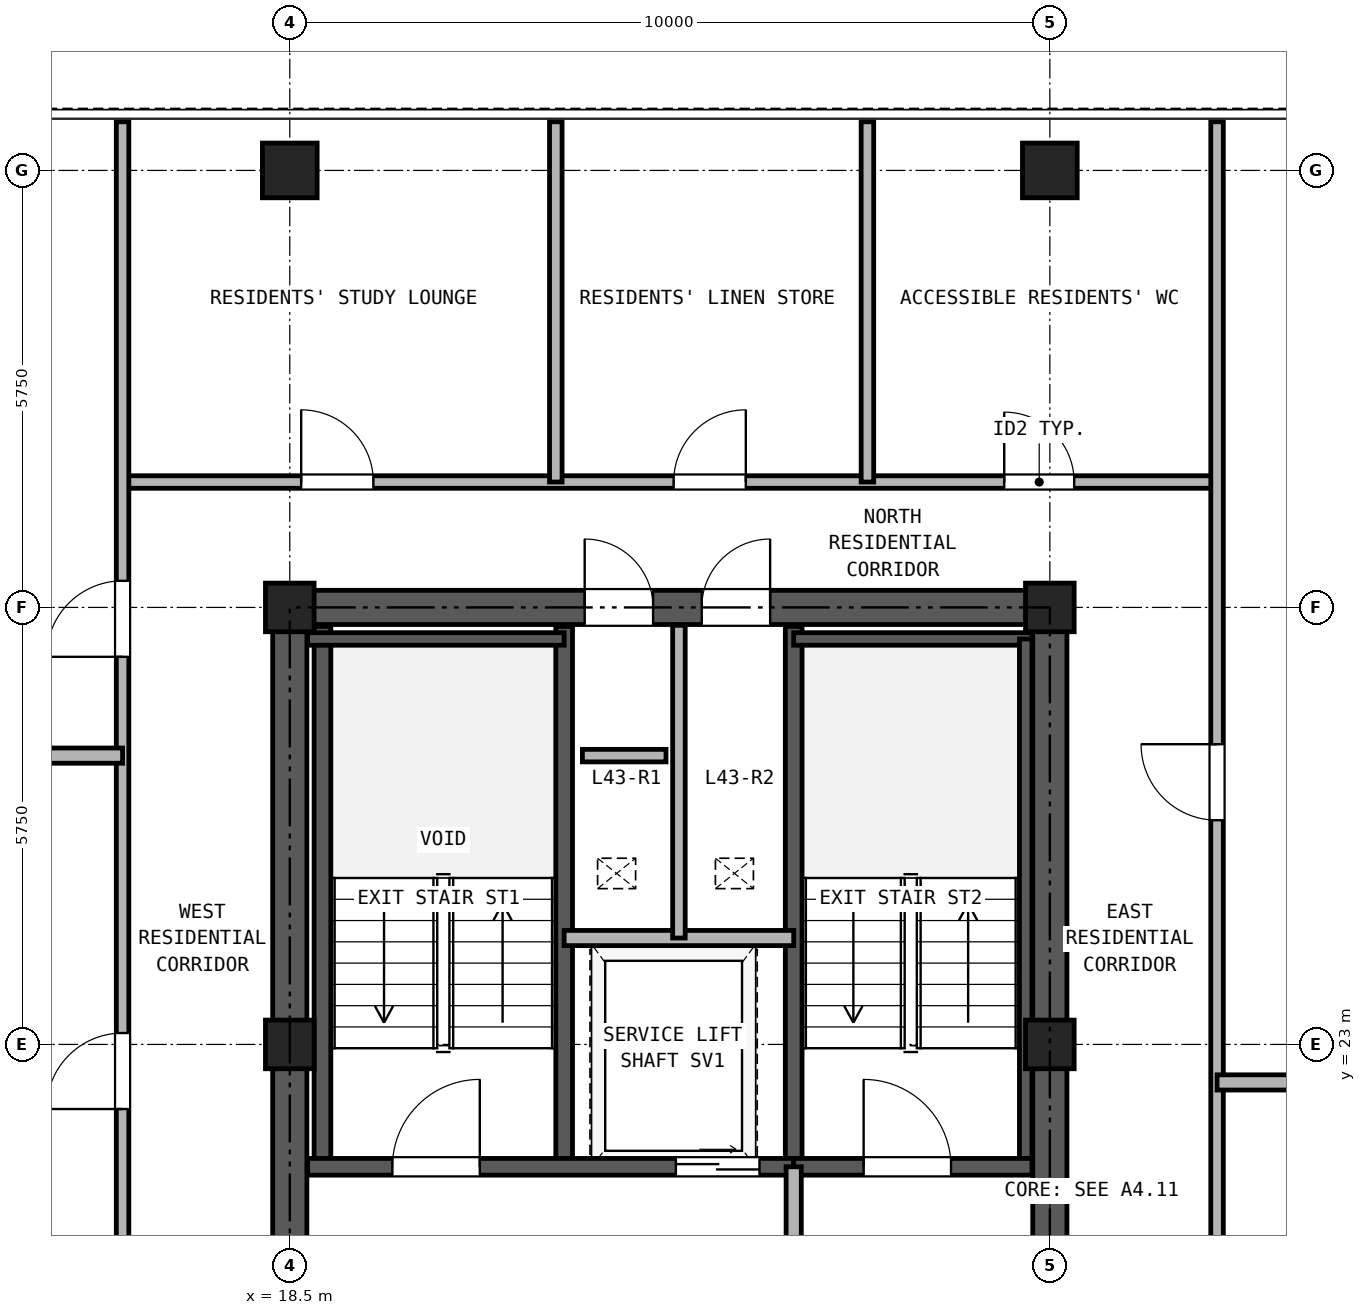
"""IFC4 building model, lengths in metres.
Left out: names, types, materials, properties, quantities, classifications, styles, units other than length and angle.
Written with IfcOpenShell. Run it as: python <this file> out.ifc"""

import sys

from ifc_helpers import new_model, si_unit, direction, frame, frame_2d, origin, origin_2d, place, context, subcontext, project, spatial, rectangle, hollow_rectangle, extrude, source, transform, mapped, element, fill, save


model = new_model("IFC4")
c1 = context("Model", 3, precision=1e-05, world=origin(), true_north=direction((0.0, 1.0)))
c2 = subcontext(c1, "Body", "Model", "MODEL_VIEW")
j1 = project(units=[si_unit("LENGTHUNIT", "METRE"), si_unit("PLANEANGLEUNIT", "RADIAN")], contexts=[c1])
p1 = place(None, origin())
s1 = spatial("IfcSite", under=j1, at=p1, CompositionType="ELEMENT")
p2 = place(p1, origin())
s2 = spatial("IfcBuilding", under=s1, at=p2, CompositionType="ELEMENT")
p3 = place(p2, frame((0.0, 0.0, 156.1)))
s3 = spatial("IfcBuildingStorey", under=s2, at=p3, CompositionType="ELEMENT", Elevation=156.1)
m1 = source(origin(), c2, "Body", "SweptSolid", [
    extrude(hollow_rectangle(XDim=0.72, YDim=0.72, WallThickness=0.04, at=origin_2d()), origin(), (0.0, 0.0, 1.0), 2.95),
])
for number, where, z_axis, x_axis in (
    (1, (18.5, 34.5, 0.0), (0.0, 0.0, 1.0), (1.0, 0.0, 0.0)),
    (2, (28.5, 34.5, 0.0), (0.0, 0.0, 1.0), (1.0, 0.0, 0.0)),
):
    element("IfcColumn", number, at=place(p3, frame(where, z_axis=z_axis, x_axis=x_axis)), inside=s3, PredefinedType="COLUMN", context=c2, shape_type="MappedRepresentation", body=[
        mapped(m1, transform((0.0, 0.0, 0.0), x_axis=(1.0, 0.0, 0.0), y_axis=(0.0, 1.0, 0.0), z_axis=(0.0, 0.0, 1.0), scale=1.0)),
    ])
m2 = source(origin(), c2, "Body", "SweptSolid", [
    extrude(hollow_rectangle(XDim=0.64, YDim=0.64, WallThickness=0.035, at=origin_2d()), origin(), (0.0, 0.0, 1.0), 2.95),
])
for number, where, z_axis, x_axis in (
    (3, (18.5, 23.0, 0.0), (0.0, 0.0, 1.0), (1.0, 0.0, 0.0)),
    (4, (18.5, 28.75, 0.0), (0.0, 0.0, 1.0), (1.0, 0.0, 0.0)),
    (5, (28.5, 23.0, 0.0), (0.0, 0.0, 1.0), (1.0, 0.0, 0.0)),
    (6, (28.5, 28.75, 0.0), (0.0, 0.0, 1.0), (1.0, 0.0, 0.0)),
):
    element("IfcColumn", number, at=place(p3, frame(where, z_axis=z_axis, x_axis=x_axis)), inside=s3, PredefinedType="COLUMN", context=c2, shape_type="MappedRepresentation", body=[
        mapped(m2, transform((0.0, 0.0, 0.0), x_axis=(1.0, 0.0, 0.0), y_axis=(0.0, 1.0, 0.0), z_axis=(0.0, 0.0, 1.0), scale=1.0)),
    ])
p4 = place(p3, frame((18.275, 28.75, 0.0), z_axis=(0.0, 0.0, 1.0), x_axis=(1.0, 0.0, 0.0)))
e7 = element("IfcWall", 7, at=p4, inside=s3, PredefinedType="SHEAR", context=c2, shape_type="SweptSolid", body=[
    extrude(rectangle(XDim=10.45, YDim=0.45, at=frame_2d((5.225, 0.0))), origin(), (0.0, 0.0, 1.0), 2.95),
])
p5 = place(p4, frame((4.105, 0.0, 0.0)))
e8 = element("IfcOpeningElement", 8, at=p5, cuts=e7, PredefinedType="OPENING", context=c2, shape_type="SweptSolid", body=[
    extrude(rectangle(XDim=0.9, YDim=2.05, at=frame_2d((0.45, 1.025))), frame((0.0, 0.235, 0.0), z_axis=(0.0, -1.0, 0.0), x_axis=(1.0, 0.0, 0.0)), (0.0, 0.0, 1.0), 0.47),
])
p6 = place(p4, frame((5.645, 0.0, 0.0)))
e9 = element("IfcOpeningElement", 9, at=p6, cuts=e7, PredefinedType="OPENING", context=c2, shape_type="SweptSolid", body=[
    extrude(rectangle(XDim=0.9, YDim=2.05, at=frame_2d((0.45, 1.025))), frame((0.0, 0.235, 0.0), z_axis=(0.0, -1.0, 0.0), x_axis=(1.0, 0.0, 0.0)), (0.0, 0.0, 1.0), 0.47),
])
p7 = place(p3, frame((18.5, 11.725, 0.0), z_axis=(0.0, 0.0, 1.0), x_axis=(0.0, 1.0, 0.0)))
e10 = element("IfcWall", 10, at=p7, inside=s3, PredefinedType="SHEAR", context=c2, shape_type="SweptSolid", body=[
    extrude(rectangle(XDim=16.8, YDim=0.45, at=frame_2d((8.4, 0.0))), origin(), (0.0, 0.0, 1.0), 2.95),
])
p8 = place(p7, frame((7.425, 0.0, 0.0)))
e11 = element("IfcOpeningElement", 11, at=p8, cuts=e10, PredefinedType="OPENING", context=c2, shape_type="SweptSolid", body=[
    extrude(rectangle(XDim=1.15, YDim=2.2, at=frame_2d((0.575, 1.1))), frame((0.0, 0.235, 0.0), z_axis=(0.0, -1.0, 0.0), x_axis=(1.0, 0.0, 0.0)), (0.0, 0.0, 1.0), 0.47),
])
p9 = place(p3, frame((28.5, 11.725, 0.0), z_axis=(0.0, 0.0, 1.0), x_axis=(0.0, 1.0, 0.0)))
e12 = element("IfcWall", 12, at=p9, inside=s3, PredefinedType="SHEAR", context=c2, shape_type="SweptSolid", body=[
    extrude(rectangle(XDim=16.8, YDim=0.45, at=frame_2d((8.4, 0.0))), origin(), (0.0, 0.0, 1.0), 2.95),
])
p10 = place(p9, frame((7.425, 0.0, 0.0)))
e13 = element("IfcOpeningElement", 13, at=p10, cuts=e12, PredefinedType="OPENING", context=c2, shape_type="SweptSolid", body=[
    extrude(rectangle(XDim=1.15, YDim=2.2, at=frame_2d((0.575, 1.1))), frame((0.0, 0.235, 0.0), z_axis=(0.0, -1.0, 0.0), x_axis=(1.0, 0.0, 0.0)), (0.0, 0.0, 1.0), 0.47),
])
for number, where, z_axis, x_axis in (
    (14, (18.93, 21.39, 0.0), (0.0, 0.0, 1.0), (0.0, 1.0, 0.0)),
    (15, (22.11, 21.39, 0.0), (0.0, 0.0, 1.0), (0.0, 1.0, 0.0)),
    (16, (25.13, 21.39, 0.0), (0.0, 0.0, 1.0), (0.0, 1.0, 0.0)),
):
    element("IfcWall", number, at=place(p3, frame(where, z_axis=z_axis, x_axis=x_axis)), inside=s3, PredefinedType="SOLIDWALL", context=c2, shape_type="SweptSolid", body=[
        extrude(rectangle(XDim=7.11, YDim=0.22, at=frame_2d((3.555, 0.0))), origin(), (0.0, 0.0, 1.0), 2.95),
    ])
p11 = place(p3, frame((18.735, 28.335, 0.0), z_axis=(0.0, 0.0, 1.0), x_axis=(1.0, 0.0, 0.0)))
e17 = element("IfcWall", 17, at=p11, inside=s3, PredefinedType="PARTITIONING", context=c2, shape_type="SweptSolid", body=[
    extrude(rectangle(XDim=3.375, YDim=0.165, at=frame_2d((1.688, 0.0))), origin(), (0.0, 0.0, 1.0), 2.95),
])
p12 = place(p3, frame((25.13, 28.335, 0.0), z_axis=(0.0, 0.0, 1.0), x_axis=(1.0, 0.0, 0.0)))
e18 = element("IfcWall", 18, at=p12, inside=s3, PredefinedType="PARTITIONING", context=c2, shape_type="SweptSolid", body=[
    extrude(rectangle(XDim=3.135, YDim=0.165, at=frame_2d((1.567, 0.0))), origin(), (0.0, 0.0, 1.0), 2.95),
])
p13 = place(p3, frame((28.183, 21.39, 0.0), z_axis=(0.0, 0.0, 1.0), x_axis=(0.0, 1.0, 0.0)))
e19 = element("IfcWall", 19, at=p13, inside=s3, PredefinedType="PARTITIONING", context=c2, shape_type="SweptSolid", body=[
    extrude(rectangle(XDim=6.945, YDim=0.165, at=frame_2d((3.473, 0.0))), origin(), (0.0, 0.0, 1.0), 2.95),
])
p14 = place(p3, frame((18.735, 21.39, 0.0), z_axis=(0.0, 0.0, 1.0), x_axis=(1.0, 0.0, 0.0)))
e20 = element("IfcWall", 20, at=p14, inside=s3, PredefinedType="SOLIDWALL", context=c2, shape_type="SweptSolid", body=[
    extrude(rectangle(XDim=6.395, YDim=0.22, at=frame_2d((3.197, 0.0))), origin(), (0.0, 0.0, 1.0), 2.95),
])
p15 = place(p14, frame((1.115, 0.0, 0.0)))
e21 = element("IfcOpeningElement", 21, at=p15, cuts=e20, PredefinedType="OPENING", context=c2, shape_type="SweptSolid", body=[
    extrude(rectangle(XDim=1.15, YDim=2.2, at=frame_2d((0.575, 1.1))), frame((0.0, 0.12, 0.0), z_axis=(0.0, -1.0, 0.0), x_axis=(1.0, 0.0, 0.0)), (0.0, 0.0, 1.0), 0.24),
])
p16 = place(p14, frame((4.845, 0.0, 0.0)))
e22 = element("IfcOpeningElement", 22, at=p16, cuts=e20, PredefinedType="OPENING", context=c2, shape_type="SweptSolid", body=[
    extrude(rectangle(XDim=1.1, YDim=2.25, at=frame_2d((0.55, 1.125))), frame((0.0, 0.12, 0.0), z_axis=(0.0, -1.0, 0.0), x_axis=(1.0, 0.0, 0.0)), (0.0, 0.0, 1.0), 0.24),
])
p17 = place(p3, frame((25.13, 21.39, 0.0), z_axis=(0.0, 0.0, 1.0), x_axis=(1.0, 0.0, 0.0)))
e23 = element("IfcWall", 23, at=p17, inside=s3, PredefinedType="SOLIDWALL", context=c2, shape_type="SweptSolid", body=[
    extrude(rectangle(XDim=3.135, YDim=0.22, at=frame_2d((1.567, 0.0))), origin(), (0.0, 0.0, 1.0), 2.95),
])
p18 = place(p17, frame((0.92, 0.0, 0.0)))
e24 = element("IfcOpeningElement", 24, at=p18, cuts=e23, PredefinedType="OPENING", context=c2, shape_type="SweptSolid", body=[
    extrude(rectangle(XDim=1.15, YDim=2.2, at=frame_2d((0.575, 1.1))), frame((0.0, 0.12, 0.0), z_axis=(0.0, -1.0, 0.0), x_axis=(1.0, 0.0, 0.0)), (0.0, 0.0, 1.0), 0.24),
])
p19 = place(p3, frame((22.11, 24.4, 0.0), z_axis=(0.0, 0.0, 1.0), x_axis=(1.0, 0.0, 0.0)))
e25 = element("IfcWall", 25, at=p19, inside=s3, PredefinedType="PARTITIONING", context=c2, shape_type="SweptSolid", body=[
    extrude(rectangle(XDim=3.02, YDim=0.2, at=frame_2d((1.51, 0.0))), origin(), (0.0, 0.0, 1.0), 2.95),
])
p20 = place(p3, frame((23.62, 24.4, 0.0), z_axis=(0.0, 0.0, 1.0), x_axis=(0.0, 1.0, 0.0)))
e26 = element("IfcWall", 26, at=p20, inside=s3, PredefinedType="PARTITIONING", context=c2, shape_type="SweptSolid", body=[
    extrude(rectangle(XDim=4.115, YDim=0.165, at=frame_2d((2.058, 0.0))), origin(), (0.0, 0.0, 1.0), 2.95),
])
p21 = place(p3, frame((25.13, 18.0, 0.0), z_axis=(0.0, 0.0, 1.0), x_axis=(0.0, 1.0, 0.0)))
e27 = element("IfcWall", 27, at=p21, inside=s3, PredefinedType="PARTITIONING", context=c2, shape_type="SweptSolid", body=[
    extrude(rectangle(XDim=3.39, YDim=0.2, at=frame_2d((1.695, 0.0))), origin(), (0.0, 0.0, 1.0), 2.95),
])
p22 = place(p21, frame((1.1, 0.0, 0.0)))
e28 = element("IfcOpeningElement", 28, at=p22, cuts=e27, PredefinedType="OPENING", context=c2, shape_type="SweptSolid", body=[
    extrude(rectangle(XDim=1.15, YDim=2.2, at=frame_2d((0.575, 1.1))), frame((0.0, 0.11, 0.0), z_axis=(0.0, -1.0, 0.0), x_axis=(1.0, 0.0, 0.0)), (0.0, 0.0, 1.0), 0.22),
])
p23 = place(p3, frame((16.3, 30.4, 0.0), z_axis=(0.0, 0.0, 1.0), x_axis=(1.0, 0.0, 0.0)))
e29 = element("IfcWall", 29, at=p23, inside=s3, PredefinedType="PARTITIONING", context=c2, shape_type="SweptSolid", body=[
    extrude(rectangle(XDim=14.4, YDim=0.165, at=frame_2d((7.2, 0.0))), origin(), (0.0, 0.0, 1.0), 2.95),
])
p24 = place(p23, frame((2.35, 0.0, 0.0)))
e30 = element("IfcOpeningElement", 30, at=p24, cuts=e29, PredefinedType="OPENING", context=c2, shape_type="SweptSolid", body=[
    extrude(rectangle(XDim=0.95, YDim=2.15, at=frame_2d((0.475, 1.075))), frame((0.0, 0.093, 0.0), z_axis=(0.0, -1.0, 0.0), x_axis=(1.0, 0.0, 0.0)), (0.0, 0.0, 1.0), 0.185),
])
p25 = place(p23, frame((7.25, 0.0, 0.0)))
e31 = element("IfcOpeningElement", 31, at=p25, cuts=e29, PredefinedType="OPENING", context=c2, shape_type="SweptSolid", body=[
    extrude(rectangle(XDim=0.95, YDim=2.15, at=frame_2d((0.475, 1.075))), frame((0.0, 0.093, 0.0), z_axis=(0.0, -1.0, 0.0), x_axis=(1.0, 0.0, 0.0)), (0.0, 0.0, 1.0), 0.185),
])
p26 = place(p23, frame((11.6, 0.0, 0.0)))
e32 = element("IfcOpeningElement", 32, at=p26, cuts=e29, PredefinedType="OPENING", context=c2, shape_type="SweptSolid", body=[
    extrude(rectangle(XDim=0.92, YDim=2.1, at=frame_2d((0.46, 1.05))), frame((0.0, 0.093, 0.0), z_axis=(0.0, -1.0, 0.0), x_axis=(1.0, 0.0, 0.0)), (0.0, 0.0, 1.0), 0.185),
])
p27 = place(p3, frame((16.3, 10.9, 0.0), z_axis=(0.0, 0.0, 1.0), x_axis=(0.0, 1.0, 0.0)))
e33 = element("IfcWall", 33, at=p27, inside=s3, PredefinedType="PARTITIONING", context=c2, shape_type="SweptSolid", body=[
    extrude(rectangle(XDim=24.24, YDim=0.165, at=frame_2d((12.12, 0.0))), origin(), (0.0, 0.0, 1.0), 2.95),
])
p28 = place(p27, frame((3.3, 0.0, 0.0)))
e34 = element("IfcOpeningElement", 34, at=p28, cuts=e33, PredefinedType="OPENING", context=c2, shape_type="SweptSolid", body=[
    extrude(rectangle(XDim=1.0, YDim=2.15, at=frame_2d((0.5, 1.075))), frame((0.0, 0.093, 0.0), z_axis=(0.0, -1.0, 0.0), x_axis=(1.0, 0.0, 0.0)), (0.0, 0.0, 1.0), 0.185),
])
p29 = place(p27, frame((11.25, 0.0, 0.0)))
e35 = element("IfcOpeningElement", 35, at=p29, cuts=e33, PredefinedType="OPENING", context=c2, shape_type="SweptSolid", body=[
    extrude(rectangle(XDim=1.0, YDim=2.15, at=frame_2d((0.5, 1.075))), frame((0.0, 0.093, 0.0), z_axis=(0.0, -1.0, 0.0), x_axis=(1.0, 0.0, 0.0)), (0.0, 0.0, 1.0), 0.185),
])
p30 = place(p27, frame((17.2, 0.0, 0.0)))
e36 = element("IfcOpeningElement", 36, at=p30, cuts=e33, PredefinedType="OPENING", context=c2, shape_type="SweptSolid", body=[
    extrude(rectangle(XDim=1.0, YDim=2.15, at=frame_2d((0.5, 1.075))), frame((0.0, 0.093, 0.0), z_axis=(0.0, -1.0, 0.0), x_axis=(1.0, 0.0, 0.0)), (0.0, 0.0, 1.0), 0.185),
])
p31 = place(p3, frame((30.7, 10.9, 0.0), z_axis=(0.0, 0.0, 1.0), x_axis=(0.0, 1.0, 0.0)))
e37 = element("IfcWall", 37, at=p31, inside=s3, PredefinedType="PARTITIONING", context=c2, shape_type="SweptSolid", body=[
    extrude(rectangle(XDim=24.24, YDim=0.165, at=frame_2d((12.12, 0.0))), origin(), (0.0, 0.0, 1.0), 2.95),
])
p32 = place(p31, frame((5.3, 0.0, 0.0)))
e38 = element("IfcOpeningElement", 38, at=p32, cuts=e37, PredefinedType="OPENING", context=c2, shape_type="SweptSolid", body=[
    extrude(rectangle(XDim=1.0, YDim=2.15, at=frame_2d((0.5, 1.075))), frame((0.0, 0.093, 0.0), z_axis=(0.0, -1.0, 0.0), x_axis=(1.0, 0.0, 0.0)), (0.0, 0.0, 1.0), 0.185),
])
p33 = place(p31, frame((15.05, 0.0, 0.0)))
e39 = element("IfcOpeningElement", 39, at=p33, cuts=e37, PredefinedType="OPENING", context=c2, shape_type="SweptSolid", body=[
    extrude(rectangle(XDim=1.0, YDim=2.15, at=frame_2d((0.5, 1.075))), frame((0.0, 0.093, 0.0), z_axis=(0.0, -1.0, 0.0), x_axis=(1.0, 0.0, 0.0)), (0.0, 0.0, 1.0), 0.185),
])
p34 = place(p3, frame((0.16, 26.8, 0.0), z_axis=(0.0, 0.0, 1.0), x_axis=(1.0, 0.0, 0.0)))
e40 = element("IfcWall", 40, at=p34, inside=s3, PredefinedType="PARTITIONING", context=c2, shape_type="SweptSolid", body=[
    extrude(rectangle(XDim=16.14, YDim=0.2, at=frame_2d((8.07, 0.0))), origin(), (0.0, 0.0, 1.0), 2.95),
])
p35 = place(p3, frame((30.7, 22.5, 0.0), z_axis=(0.0, 0.0, 1.0), x_axis=(1.0, 0.0, 0.0)))
e41 = element("IfcWall", 41, at=p35, inside=s3, PredefinedType="PARTITIONING", context=c2, shape_type="SweptSolid", body=[
    extrude(rectangle(XDim=10.94, YDim=0.2, at=frame_2d((5.47, 0.0))), origin(), (0.0, 0.0, 1.0), 2.95),
])
for number, where, z_axis, x_axis in (
    (42, (22.0, 30.4, 0.0), (0.0, 0.0, 1.0), (0.0, 1.0, 0.0)),
    (43, (26.1, 30.4, 0.0), (0.0, 0.0, 1.0), (0.0, 1.0, 0.0)),
):
    element("IfcWall", number, at=place(p3, frame(where, z_axis=z_axis, x_axis=x_axis)), inside=s3, PredefinedType="PARTITIONING", context=c2, shape_type="SweptSolid", body=[
        extrude(rectangle(XDim=4.74, YDim=0.165, at=frame_2d((2.37, 0.0))), origin(), (0.0, 0.0, 1.0), 2.95),
    ])
p36 = place(p3, frame((22.35, 26.8, 0.0), z_axis=(0.0, 0.0, 1.0), x_axis=(1.0, 0.0, 0.0)))
e44 = element("IfcWall", 44, at=p36, inside=s3, PredefinedType="PARTITIONING", context=c2, shape_type="SweptSolid", body=[
    extrude(rectangle(XDim=1.1, YDim=0.165, at=frame_2d((0.55, 0.0))), origin(), (0.0, 0.0, 1.0), 2.95),
])
p37 = place(p15, frame((1.15, 0.0, 0.0), z_axis=(0.0, 0.0, 1.0), x_axis=(-1.0, 0.0, 0.0)))
e45 = element("IfcDoor", 45, at=p37, inside=s3, OperationType="SINGLE_SWING_RIGHT", PredefinedType="DOOR", context=c2, shape_type="SweptSolid", body=[
    extrude(rectangle(XDim=1.15, YDim=2.2, at=frame_2d((0.575, 1.1))), frame((0.0, 0.025, 0.0), z_axis=(0.0, -1.0, 0.0), x_axis=(1.0, 0.0, 0.0)), (0.0, 0.0, 1.0), 0.05),
])
fill(e21, e45)
p38 = place(p18, frame((1.15, 0.0, 0.0), z_axis=(0.0, 0.0, 1.0), x_axis=(-1.0, 0.0, 0.0)))
e46 = element("IfcDoor", 46, at=p38, inside=s3, OperationType="SINGLE_SWING_LEFT", PredefinedType="DOOR", context=c2, shape_type="SweptSolid", body=[
    extrude(rectangle(XDim=1.15, YDim=2.2, at=frame_2d((0.575, 1.1))), frame((0.0, 0.025, 0.0), z_axis=(0.0, -1.0, 0.0), x_axis=(1.0, 0.0, 0.0)), (0.0, 0.0, 1.0), 0.05),
])
fill(e24, e46)
p39 = place(p16, frame((1.1, 0.0, 0.0), z_axis=(0.0, 0.0, 1.0), x_axis=(-1.0, 0.0, 0.0)))
e47 = element("IfcDoor", 47, at=p39, inside=s3, OperationType="DOUBLE_DOOR_SLIDING", PredefinedType="DOOR", context=c2, shape_type="SweptSolid", body=[
    extrude(rectangle(XDim=1.1, YDim=2.25, at=frame_2d((0.55, 1.125))), frame((0.0, 0.025, 0.0), z_axis=(0.0, -1.0, 0.0), x_axis=(1.0, 0.0, 0.0)), (0.0, 0.0, 1.0), 0.05),
])
fill(e22, e47)
p40 = place(p5, origin())
e48 = element("IfcDoor", 48, at=p40, inside=s3, OperationType="SINGLE_SWING_LEFT", PredefinedType="DOOR", context=c2, shape_type="SweptSolid", body=[
    extrude(rectangle(XDim=0.9, YDim=2.05, at=frame_2d((0.45, 1.025))), frame((0.0, 0.025, 0.0), z_axis=(0.0, -1.0, 0.0), x_axis=(1.0, 0.0, 0.0)), (0.0, 0.0, 1.0), 0.05),
])
fill(e8, e48)
p41 = place(p6, origin())
e49 = element("IfcDoor", 49, at=p41, inside=s3, OperationType="SINGLE_SWING_RIGHT", PredefinedType="DOOR", context=c2, shape_type="SweptSolid", body=[
    extrude(rectangle(XDim=0.9, YDim=2.05, at=frame_2d((0.45, 1.025))), frame((0.0, 0.025, 0.0), z_axis=(0.0, -1.0, 0.0), x_axis=(1.0, 0.0, 0.0)), (0.0, 0.0, 1.0), 0.05),
])
fill(e9, e49)
p42 = place(p29, origin())
e50 = element("IfcDoor", 50, at=p42, inside=s3, OperationType="SINGLE_SWING_LEFT", PredefinedType="DOOR", context=c2, shape_type="SweptSolid", body=[
    extrude(rectangle(XDim=1.0, YDim=2.15, at=frame_2d((0.5, 1.075))), frame((0.0, 0.025, 0.0), z_axis=(0.0, -1.0, 0.0), x_axis=(1.0, 0.0, 0.0)), (0.0, 0.0, 1.0), 0.05),
])
fill(e35, e50)
p43 = place(p30, origin())
e51 = element("IfcDoor", 51, at=p43, inside=s3, OperationType="SINGLE_SWING_LEFT", PredefinedType="DOOR", context=c2, shape_type="SweptSolid", body=[
    extrude(rectangle(XDim=1.0, YDim=2.15, at=frame_2d((0.5, 1.075))), frame((0.0, 0.025, 0.0), z_axis=(0.0, -1.0, 0.0), x_axis=(1.0, 0.0, 0.0)), (0.0, 0.0, 1.0), 0.05),
])
fill(e36, e51)
p44 = place(p33, frame((1.0, 0.0, 0.0), z_axis=(0.0, 0.0, 1.0), x_axis=(-1.0, 0.0, 0.0)))
e52 = element("IfcDoor", 52, at=p44, inside=s3, OperationType="SINGLE_SWING_RIGHT", PredefinedType="DOOR", context=c2, shape_type="SweptSolid", body=[
    extrude(rectangle(XDim=1.0, YDim=2.15, at=frame_2d((0.5, 1.075))), frame((0.0, 0.025, 0.0), z_axis=(0.0, -1.0, 0.0), x_axis=(1.0, 0.0, 0.0)), (0.0, 0.0, 1.0), 0.05),
])
fill(e39, e52)
p45 = place(p24, origin())
e53 = element("IfcDoor", 53, at=p45, inside=s3, OperationType="SINGLE_SWING_LEFT", PredefinedType="DOOR", context=c2, shape_type="SweptSolid", body=[
    extrude(rectangle(XDim=0.95, YDim=2.15, at=frame_2d((0.475, 1.075))), frame((0.0, 0.025, 0.0), z_axis=(0.0, -1.0, 0.0), x_axis=(1.0, 0.0, 0.0)), (0.0, 0.0, 1.0), 0.05),
])
fill(e30, e53)
p46 = place(p25, origin())
e54 = element("IfcDoor", 54, at=p46, inside=s3, OperationType="SINGLE_SWING_RIGHT", PredefinedType="DOOR", context=c2, shape_type="SweptSolid", body=[
    extrude(rectangle(XDim=0.95, YDim=2.15, at=frame_2d((0.475, 1.075))), frame((0.0, 0.025, 0.0), z_axis=(0.0, -1.0, 0.0), x_axis=(1.0, 0.0, 0.0)), (0.0, 0.0, 1.0), 0.05),
])
fill(e31, e54)
p47 = place(p26, origin())
e55 = element("IfcDoor", 55, at=p47, inside=s3, OperationType="SINGLE_SWING_LEFT", PredefinedType="DOOR", context=c2, shape_type="SweptSolid", body=[
    extrude(rectangle(XDim=0.92, YDim=2.1, at=frame_2d((0.46, 1.05))), frame((0.0, 0.025, 0.0), z_axis=(0.0, -1.0, 0.0), x_axis=(1.0, 0.0, 0.0)), (0.0, 0.0, 1.0), 0.05),
])
fill(e32, e55)
save(model, sys.argv[1])
